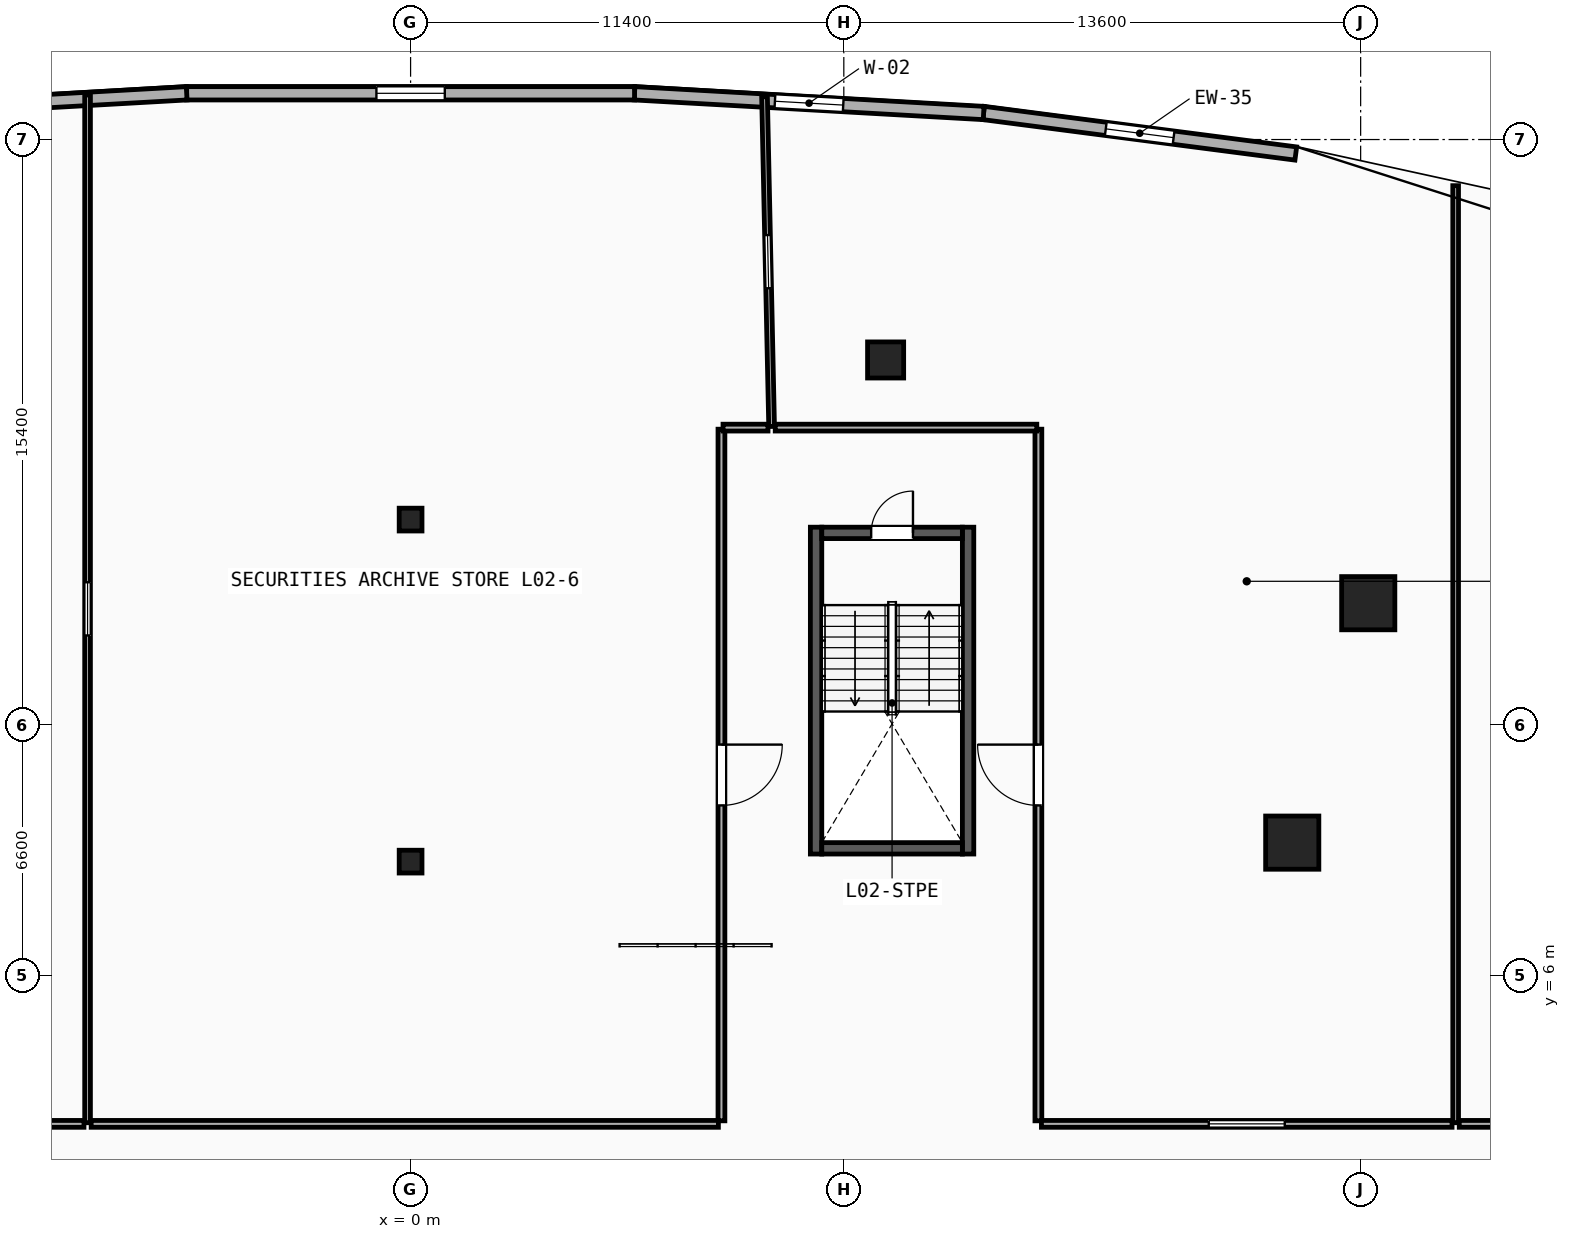
"""IFC4 building model, lengths in metres.
Left out: names, types, materials, properties, quantities, classifications, styles, units other than length and angle.
Written with IfcOpenShell. Run it as: python <this file> out.ifc"""

import sys

from ifc_helpers import new_model, si_unit, direction, frame, frame_2d, origin, origin_2d, place, context, subcontext, project, spatial, rectangle, hollow_rectangle, circle, extrude, element, fill, save


model = new_model("IFC4")
c1 = context("Model", 3, precision=1e-05, world=origin(), true_north=direction((0.0, 1.0)))
c2 = subcontext(c1, "Body", "Model", "MODEL_VIEW")
j1 = project(units=[si_unit("LENGTHUNIT", "METRE"), si_unit("PLANEANGLEUNIT", "RADIAN")], contexts=[c1])
p1 = place(None, origin())
s1 = spatial("IfcSite", under=j1, at=p1, CompositionType="ELEMENT")
p2 = place(p1, origin())
s2 = spatial("IfcBuilding", under=s1, at=p2, CompositionType="ELEMENT")
p3 = place(p2, frame((0.0, 0.0, 12.0)))
s3 = spatial("IfcBuildingStorey", under=s2, at=p3, CompositionType="ELEMENT", Elevation=12.0)
for number, where, z_axis, x_axis in (
    (1, (23.2, 9.5, 0.0), (0.0, 0.0, 1.0), (1.0, 0.0, 0.0)),
    (2, (25.2, 15.8, 0.0), (0.0, 0.0, 1.0), (1.0, 0.0, 0.0)),
):
    element("IfcColumn", number, at=place(p3, frame(where, z_axis=z_axis, x_axis=x_axis)), inside=s3, PredefinedType="COLUMN", context=c2, shape_type="SweptSolid", body=[
        extrude(rectangle(XDim=1.4, YDim=1.4, at=origin_2d()), origin(), (0.0, 0.0, 1.0), 4.0),
    ])
for number, where, z_axis, x_axis in (
    (3, (0.0, 9.0, 0.0), (0.0, 0.0, 1.0), (1.0, 0.0, 0.0)),
    (4, (0.0, 18.0, 0.0), (0.0, 0.0, 1.0), (1.0, 0.0, 0.0)),
):
    element("IfcColumn", number, at=place(p3, frame(where, z_axis=z_axis, x_axis=x_axis)), inside=s3, PredefinedType="COLUMN", context=c2, shape_type="SweptSolid", body=[
        extrude(hollow_rectangle(XDim=0.6, YDim=0.6, WallThickness=0.032, at=origin_2d()), origin(), (0.0, 0.0, 1.0), 4.0),
    ])
p4 = place(p3, frame((12.5, 22.2, 0.0), z_axis=(0.0, 0.0, 1.0), x_axis=(1.0, 0.0, 0.0)))
e5 = element("IfcColumn", 5, at=p4, inside=s3, PredefinedType="PILASTER", context=c2, shape_type="SweptSolid", body=[
    extrude(circle(Radius=0.475, at=origin_2d()), origin(), (0.0, 0.0, 1.0), 4.0),
])
p5 = place(p3, frame((23.293, 27.632, 0.0), z_axis=(0.0, 0.0, 1.0), x_axis=(-0.99168663472, 0.128676410104, 0.0)))
e6 = element("IfcWall", 6, at=p5, inside=s3, PredefinedType="SOLIDWALL", context=c2, shape_type="SweptSolid", body=[
    extrude(rectangle(XDim=8.284, YDim=0.35, at=frame_2d((4.142, 0.0))), origin(), (0.0, 0.0, 1.0), 3.65),
])
p6 = place(p5, frame((3.242, 0.0, 0.85)))
e7 = element("IfcOpeningElement", 7, at=p6, cuts=e6, PredefinedType="OPENING", context=c2, shape_type="SweptSolid", body=[
    extrude(rectangle(XDim=1.8, YDim=2.4, at=frame_2d((0.9, 1.2))), frame((0.0, 0.185, 0.0), z_axis=(0.0, -1.0, 0.0), x_axis=(1.0, 0.0, 0.0)), (0.0, 0.0, 1.0), 0.37),
])
p7 = place(p3, frame((15.079, 28.698, 0.0), z_axis=(0.0, 0.0, 1.0), x_axis=(-0.998413463137, 0.056307695976, 0.0)))
e8 = element("IfcWall", 8, at=p7, inside=s3, PredefinedType="SOLIDWALL", context=c2, shape_type="SweptSolid", body=[
    extrude(rectangle(XDim=9.201, YDim=0.35, at=frame_2d((4.6, 0.0))), origin(), (0.0, 0.0, 1.0), 3.65),
])
p8 = place(p7, frame((3.7, 0.0, 0.85)))
e9 = element("IfcOpeningElement", 9, at=p8, cuts=e8, PredefinedType="OPENING", context=c2, shape_type="SweptSolid", body=[
    extrude(rectangle(XDim=1.8, YDim=2.4, at=frame_2d((0.9, 1.2))), frame((0.0, 0.185, 0.0), z_axis=(0.0, -1.0, 0.0), x_axis=(1.0, 0.0, 0.0)), (0.0, 0.0, 1.0), 0.37),
])
p9 = place(p3, frame((5.893, 29.216, 0.0), z_axis=(0.0, 0.0, 1.0), x_axis=(-1.0, 0.0, 0.0)))
e10 = element("IfcWall", 10, at=p9, inside=s3, PredefinedType="SOLIDWALL", context=c2, shape_type="SweptSolid", body=[
    extrude(rectangle(XDim=11.785, YDim=0.35, at=frame_2d((5.893, 0.0))), origin(), (0.0, 0.0, 1.0), 3.65),
])
p10 = place(p9, frame((4.992, 0.0, 0.85)))
e11 = element("IfcOpeningElement", 11, at=p10, cuts=e10, PredefinedType="OPENING", context=c2, shape_type="SweptSolid", body=[
    extrude(rectangle(XDim=1.8, YDim=2.4, at=frame_2d((0.9, 1.2))), frame((0.0, 0.185, 0.0), z_axis=(0.0, -1.0, 0.0), x_axis=(1.0, 0.0, 0.0)), (0.0, 0.0, 1.0), 0.37),
])
p11 = place(p3, frame((-5.893, 29.216, 0.0), z_axis=(0.0, 0.0, 1.0), x_axis=(-0.998413463137, -0.056307695976, 0.0)))
e12 = element("IfcWall", 12, at=p11, inside=s3, PredefinedType="SOLIDWALL", context=c2, shape_type="SweptSolid", body=[
    extrude(rectangle(XDim=9.201, YDim=0.35, at=frame_2d((4.6, 0.0))), origin(), (0.0, 0.0, 1.0), 3.65),
])
p12 = place(p11, frame((3.7, 0.0, 0.85)))
e13 = element("IfcOpeningElement", 13, at=p12, cuts=e12, PredefinedType="OPENING", context=c2, shape_type="SweptSolid", body=[
    extrude(rectangle(XDim=1.8, YDim=2.4, at=frame_2d((0.9, 1.2))), frame((0.0, 0.185, 0.0), z_axis=(0.0, -1.0, 0.0), x_axis=(1.0, 0.0, 0.0)), (0.0, 0.0, 1.0), 0.37),
])
for number, where, z_axis, x_axis in (
    (14, (10.67, 9.2, 0.0), (0.0, 0.0, 1.0), (0.0, 1.0, 0.0)),
    (15, (14.67, 9.2, 0.0), (0.0, 0.0, 1.0), (0.0, 1.0, 0.0)),
):
    element("IfcWall", number, at=place(p3, frame(where, z_axis=z_axis, x_axis=x_axis)), inside=s3, PredefinedType="SHEAR", context=c2, shape_type="SweptSolid", body=[
        extrude(rectangle(XDim=8.6, YDim=0.3, at=frame_2d((4.3, 0.0))), origin(), (0.0, 0.0, 1.0), 3.65),
    ])
p13 = place(p3, frame((10.82, 17.65, 0.0), z_axis=(0.0, 0.0, 1.0), x_axis=(1.0, 0.0, 0.0)))
e16 = element("IfcWall", 16, at=p13, inside=s3, PredefinedType="SHEAR", context=c2, shape_type="SweptSolid", body=[
    extrude(rectangle(XDim=3.7, YDim=0.3, at=frame_2d((1.85, 0.0))), origin(), (0.0, 0.0, 1.0), 3.65),
])
p14 = place(p13, frame((1.3, 0.0, 0.0)))
e17 = element("IfcOpeningElement", 17, at=p14, cuts=e16, PredefinedType="OPENING", context=c2, shape_type="SweptSolid", body=[
    extrude(rectangle(XDim=1.1, YDim=2.15, at=frame_2d((0.55, 1.075))), frame((0.0, 0.16, 0.0), z_axis=(0.0, -1.0, 0.0), x_axis=(1.0, 0.0, 0.0)), (0.0, 0.0, 1.0), 0.32),
])
p15 = place(p3, frame((10.82, 9.35, 0.0), z_axis=(0.0, 0.0, 1.0), x_axis=(1.0, 0.0, 0.0)))
e18 = element("IfcWall", 18, at=p15, inside=s3, PredefinedType="SHEAR", context=c2, shape_type="SweptSolid", body=[
    extrude(rectangle(XDim=3.7, YDim=0.3, at=frame_2d((1.85, 0.0))), origin(), (0.0, 0.0, 1.0), 3.65),
])
p16 = place(p3, frame((-8.5, 2.13, 0.0), z_axis=(0.0, 0.0, 1.0), x_axis=(0.0, 1.0, 0.0)))
e19 = element("IfcWall", 19, at=p16, inside=s3, PredefinedType="PARTITIONING", context=c2, shape_type="SweptSolid", body=[
    extrude(rectangle(XDim=27.042, YDim=0.15, at=frame_2d((13.521, 0.0))), origin(), (0.0, 0.0, 1.0), 3.65),
])
p17 = place(p16, frame((12.821, 0.0, 1.05)))
e20 = element("IfcOpeningElement", 20, at=p17, cuts=e19, PredefinedType="OPENING", context=c2, shape_type="SweptSolid", body=[
    extrude(rectangle(XDim=1.4, YDim=1.5, at=frame_2d((0.7, 0.75))), frame((0.0, 0.085, 0.0), z_axis=(0.0, -1.0, 0.0), x_axis=(1.0, 0.0, 0.0)), (0.0, 0.0, 1.0), 0.17),
])
p18 = place(p3, frame((9.5, 20.45, 0.0), z_axis=(0.0, 0.0, 1.0), x_axis=(-0.021469256011, 0.99976950896, 0.0)))
e21 = element("IfcWall", 21, at=p18, inside=s3, PredefinedType="PARTITIONING", context=c2, shape_type="SweptSolid", body=[
    extrude(rectangle(XDim=8.677, YDim=0.15, at=frame_2d((4.338, 0.0))), origin(), (0.0, 0.0, 1.0), 3.65),
])
p19 = place(p18, frame((3.638, 0.0, 1.05)))
e22 = element("IfcOpeningElement", 22, at=p19, cuts=e21, PredefinedType="OPENING", context=c2, shape_type="SweptSolid", body=[
    extrude(rectangle(XDim=1.4, YDim=1.5, at=frame_2d((0.7, 0.75))), frame((0.0, 0.085, 0.0), z_axis=(0.0, -1.0, 0.0), x_axis=(1.0, 0.0, 0.0)), (0.0, 0.0, 1.0), 0.17),
])
p20 = place(p3, frame((27.5, 2.13, 0.0), z_axis=(0.0, 0.0, 1.0), x_axis=(0.0, 1.0, 0.0)))
e23 = element("IfcWall", 23, at=p20, inside=s3, PredefinedType="PARTITIONING", context=c2, shape_type="SweptSolid", body=[
    extrude(rectangle(XDim=24.656, YDim=0.15, at=frame_2d((12.328, 0.0))), origin(), (0.0, 0.0, 1.0), 3.65),
])
p21 = place(p3, frame((35.479, 2.1, 0.0), z_axis=(0.0, 0.0, 1.0), x_axis=(-1.0, 0.0, 0.0)))
e24 = element("IfcWall", 24, at=p21, inside=s3, PredefinedType="PARTITIONING", context=c2, shape_type="SweptSolid", body=[
    extrude(rectangle(XDim=7.884, YDim=0.18, at=frame_2d((3.942, 0.0))), origin(), (0.0, 0.0, 1.0), 3.65),
])
p22 = place(p21, frame((2.942, 0.0, 1.05)))
e25 = element("IfcOpeningElement", 25, at=p22, cuts=e24, PredefinedType="OPENING", context=c2, shape_type="SweptSolid", body=[
    extrude(rectangle(XDim=2.0, YDim=1.5, at=frame_2d((1.0, 0.75))), frame((0.0, 0.1, 0.0), z_axis=(0.0, -1.0, 0.0), x_axis=(1.0, 0.0, 0.0)), (0.0, 0.0, 1.0), 0.2),
])
p23 = place(p3, frame((8.18, 20.378, 0.0), z_axis=(0.0, 0.0, 1.0), x_axis=(0.0, -1.0, 0.0)))
e26 = element("IfcWall", 26, at=p23, inside=s3, PredefinedType="PARTITIONING", context=c2, shape_type="SweptSolid", body=[
    extrude(rectangle(XDim=18.198, YDim=0.18, at=frame_2d((9.099, 0.0))), origin(), (0.0, 0.0, 1.0), 3.65),
])
p24 = place(p23, frame((8.299, 0.0, 0.0)))
e27 = element("IfcOpeningElement", 27, at=p24, cuts=e26, PredefinedType="OPENING", context=c2, shape_type="SweptSolid", body=[
    extrude(rectangle(XDim=1.6, YDim=2.2, at=frame_2d((0.8, 1.1))), frame((0.0, 0.1, 0.0), z_axis=(0.0, -1.0, 0.0), x_axis=(1.0, 0.0, 0.0)), (0.0, 0.0, 1.0), 0.2),
])
p25 = place(p3, frame((8.1, 2.1, 0.0), z_axis=(0.0, 0.0, 1.0), x_axis=(-1.0, 0.0, 0.0)))
e28 = element("IfcWall", 28, at=p25, inside=s3, PredefinedType="PARTITIONING", context=c2, shape_type="SweptSolid", body=[
    extrude(rectangle(XDim=16.505, YDim=0.18, at=frame_2d((8.252, 0.0))), origin(), (0.0, 0.0, 1.0), 3.65),
])
p26 = place(p3, frame((9.405, 20.42, 0.0), z_axis=(0.0, 0.0, 1.0), x_axis=(-1.0, 0.0, 0.0)))
e29 = element("IfcWall", 29, at=p26, inside=s3, PredefinedType="PARTITIONING", context=c2, shape_type="SweptSolid", body=[
    extrude(rectangle(XDim=1.184, YDim=0.18, at=frame_2d((0.592, 0.0))), origin(), (0.0, 0.0, 1.0), 3.65),
])
p27 = place(p3, frame((16.52, 2.18, 0.0), z_axis=(0.0, 0.0, 1.0), x_axis=(0.0, 1.0, 0.0)))
e30 = element("IfcWall", 30, at=p27, inside=s3, PredefinedType="PARTITIONING", context=c2, shape_type="SweptSolid", body=[
    extrude(rectangle(XDim=18.198, YDim=0.18, at=frame_2d((9.099, 0.0))), origin(), (0.0, 0.0, 1.0), 3.65),
])
p28 = place(p27, frame((8.299, 0.0, 0.0)))
e31 = element("IfcOpeningElement", 31, at=p28, cuts=e30, PredefinedType="OPENING", context=c2, shape_type="SweptSolid", body=[
    extrude(rectangle(XDim=1.6, YDim=2.2, at=frame_2d((0.8, 1.1))), frame((0.0, 0.1, 0.0), z_axis=(0.0, -1.0, 0.0), x_axis=(1.0, 0.0, 0.0)), (0.0, 0.0, 1.0), 0.2),
])
p29 = place(p3, frame((27.405, 2.1, 0.0), z_axis=(0.0, 0.0, 1.0), x_axis=(-1.0, 0.0, 0.0)))
e32 = element("IfcWall", 32, at=p29, inside=s3, PredefinedType="PARTITIONING", context=c2, shape_type="SweptSolid", body=[
    extrude(rectangle(XDim=10.805, YDim=0.18, at=frame_2d((5.402, 0.0))), origin(), (0.0, 0.0, 1.0), 3.65),
])
p30 = place(p29, frame((4.402, 0.0, 1.05)))
e33 = element("IfcOpeningElement", 33, at=p30, cuts=e32, PredefinedType="OPENING", context=c2, shape_type="SweptSolid", body=[
    extrude(rectangle(XDim=2.0, YDim=1.5, at=frame_2d((1.0, 0.75))), frame((0.0, 0.1, 0.0), z_axis=(0.0, -1.0, 0.0), x_axis=(1.0, 0.0, 0.0)), (0.0, 0.0, 1.0), 0.2),
])
p31 = place(p3, frame((16.479, 20.42, 0.0), z_axis=(0.0, 0.0, 1.0), x_axis=(-1.0, 0.0, 0.0)))
e34 = element("IfcWall", 34, at=p31, inside=s3, PredefinedType="PARTITIONING", context=c2, shape_type="SweptSolid", body=[
    extrude(rectangle(XDim=6.884, YDim=0.18, at=frame_2d((3.442, 0.0))), origin(), (0.0, 0.0, 1.0), 3.65),
])
p32 = place(p3, frame((-8.595, 2.1, 0.0), z_axis=(0.0, 0.0, 1.0), x_axis=(-1.0, 0.0, 0.0)))
e35 = element("IfcWall", 35, at=p32, inside=s3, PredefinedType="PARTITIONING", context=c2, shape_type="SweptSolid", body=[
    extrude(rectangle(XDim=8.445, YDim=0.18, at=frame_2d((4.223, 0.0))), origin(), (0.0, 0.0, 1.0), 2.877),
])
p33 = place(p32, frame((3.522, 0.0, 1.05)))
e36 = element("IfcOpeningElement", 36, at=p33, cuts=e35, PredefinedType="OPENING", context=c2, shape_type="SweptSolid", body=[
    extrude(rectangle(XDim=1.4, YDim=1.5, at=frame_2d((0.7, 0.75))), frame((0.0, 0.1, 0.0), z_axis=(0.0, -1.0, 0.0), x_axis=(1.0, 0.0, 0.0)), (0.0, 0.0, 1.0), 0.2),
])
p34 = place(p6, origin())
e37 = element("IfcWindow", 37, at=p34, inside=s3, PartitioningType="SINGLE_PANEL", PredefinedType="WINDOW", context=c2, shape_type="SweptSolid", body=[
    extrude(rectangle(XDim=1.8, YDim=2.4, at=frame_2d((0.9, 1.2))), frame((0.0, 0.03, 0.0), z_axis=(0.0, -1.0, 0.0), x_axis=(1.0, 0.0, 0.0)), (0.0, 0.0, 1.0), 0.06),
])
fill(e7, e37)
p35 = place(p8, origin())
e38 = element("IfcWindow", 38, at=p35, inside=s3, PartitioningType="SINGLE_PANEL", PredefinedType="WINDOW", context=c2, shape_type="SweptSolid", body=[
    extrude(rectangle(XDim=1.8, YDim=2.4, at=frame_2d((0.9, 1.2))), frame((0.0, 0.03, 0.0), z_axis=(0.0, -1.0, 0.0), x_axis=(1.0, 0.0, 0.0)), (0.0, 0.0, 1.0), 0.06),
])
fill(e9, e38)
p36 = place(p10, origin())
e39 = element("IfcWindow", 39, at=p36, inside=s3, PartitioningType="SINGLE_PANEL", PredefinedType="WINDOW", context=c2, shape_type="SweptSolid", body=[
    extrude(rectangle(XDim=1.8, YDim=2.4, at=frame_2d((0.9, 1.2))), frame((0.0, 0.03, 0.0), z_axis=(0.0, -1.0, 0.0), x_axis=(1.0, 0.0, 0.0)), (0.0, 0.0, 1.0), 0.06),
])
fill(e11, e39)
p37 = place(p14, origin())
e40 = element("IfcDoor", 40, at=p37, inside=s3, OperationType="SINGLE_SWING_RIGHT", PredefinedType="DOOR", context=c2, shape_type="SweptSolid", body=[
    extrude(rectangle(XDim=1.1, YDim=2.15, at=frame_2d((0.55, 1.075))), frame((0.0, 0.025, 0.0), z_axis=(0.0, -1.0, 0.0), x_axis=(1.0, 0.0, 0.0)), (0.0, 0.0, 1.0), 0.05),
])
fill(e17, e40)
p38 = place(p24, origin())
e41 = element("IfcDoor", 41, at=p38, inside=s3, OperationType="SINGLE_SWING_LEFT", PredefinedType="DOOR", context=c2, shape_type="SweptSolid", body=[
    extrude(rectangle(XDim=1.6, YDim=2.2, at=frame_2d((0.8, 1.1))), frame((0.0, 0.025, 0.0), z_axis=(0.0, -1.0, 0.0), x_axis=(1.0, 0.0, 0.0)), (0.0, 0.0, 1.0), 0.05),
])
fill(e27, e41)
p39 = place(p28, origin())
e42 = element("IfcDoor", 42, at=p39, inside=s3, OperationType="SINGLE_SWING_RIGHT", PredefinedType="DOOR", context=c2, shape_type="SweptSolid", body=[
    extrude(rectangle(XDim=1.6, YDim=2.2, at=frame_2d((0.8, 1.1))), frame((0.0, 0.025, 0.0), z_axis=(0.0, -1.0, 0.0), x_axis=(1.0, 0.0, 0.0)), (0.0, 0.0, 1.0), 0.05),
])
fill(e31, e42)
p40 = place(p17, origin())
e43 = element("IfcWindow", 43, at=p40, inside=s3, PartitioningType="SINGLE_PANEL", PredefinedType="WINDOW", context=c2, shape_type="SweptSolid", body=[
    extrude(rectangle(XDim=1.4, YDim=1.5, at=frame_2d((0.7, 0.75))), frame((0.0, 0.03, 0.0), z_axis=(0.0, -1.0, 0.0), x_axis=(1.0, 0.0, 0.0)), (0.0, 0.0, 1.0), 0.06),
])
fill(e20, e43)
p41 = place(p19, origin())
e44 = element("IfcWindow", 44, at=p41, inside=s3, PartitioningType="SINGLE_PANEL", PredefinedType="WINDOW", context=c2, shape_type="SweptSolid", body=[
    extrude(rectangle(XDim=1.4, YDim=1.5, at=frame_2d((0.7, 0.75))), frame((0.0, 0.03, 0.0), z_axis=(0.0, -1.0, 0.0), x_axis=(1.0, 0.0, 0.0)), (0.0, 0.0, 1.0), 0.06),
])
fill(e22, e44)
p42 = place(p30, origin())
e45 = element("IfcWindow", 45, at=p42, inside=s3, PartitioningType="SINGLE_PANEL", PredefinedType="WINDOW", context=c2, shape_type="SweptSolid", body=[
    extrude(rectangle(XDim=2.0, YDim=1.5, at=frame_2d((1.0, 0.75))), frame((0.0, 0.03, 0.0), z_axis=(0.0, -1.0, 0.0), x_axis=(1.0, 0.0, 0.0)), (0.0, 0.0, 1.0), 0.06),
])
fill(e33, e45)
save(model, sys.argv[1])
